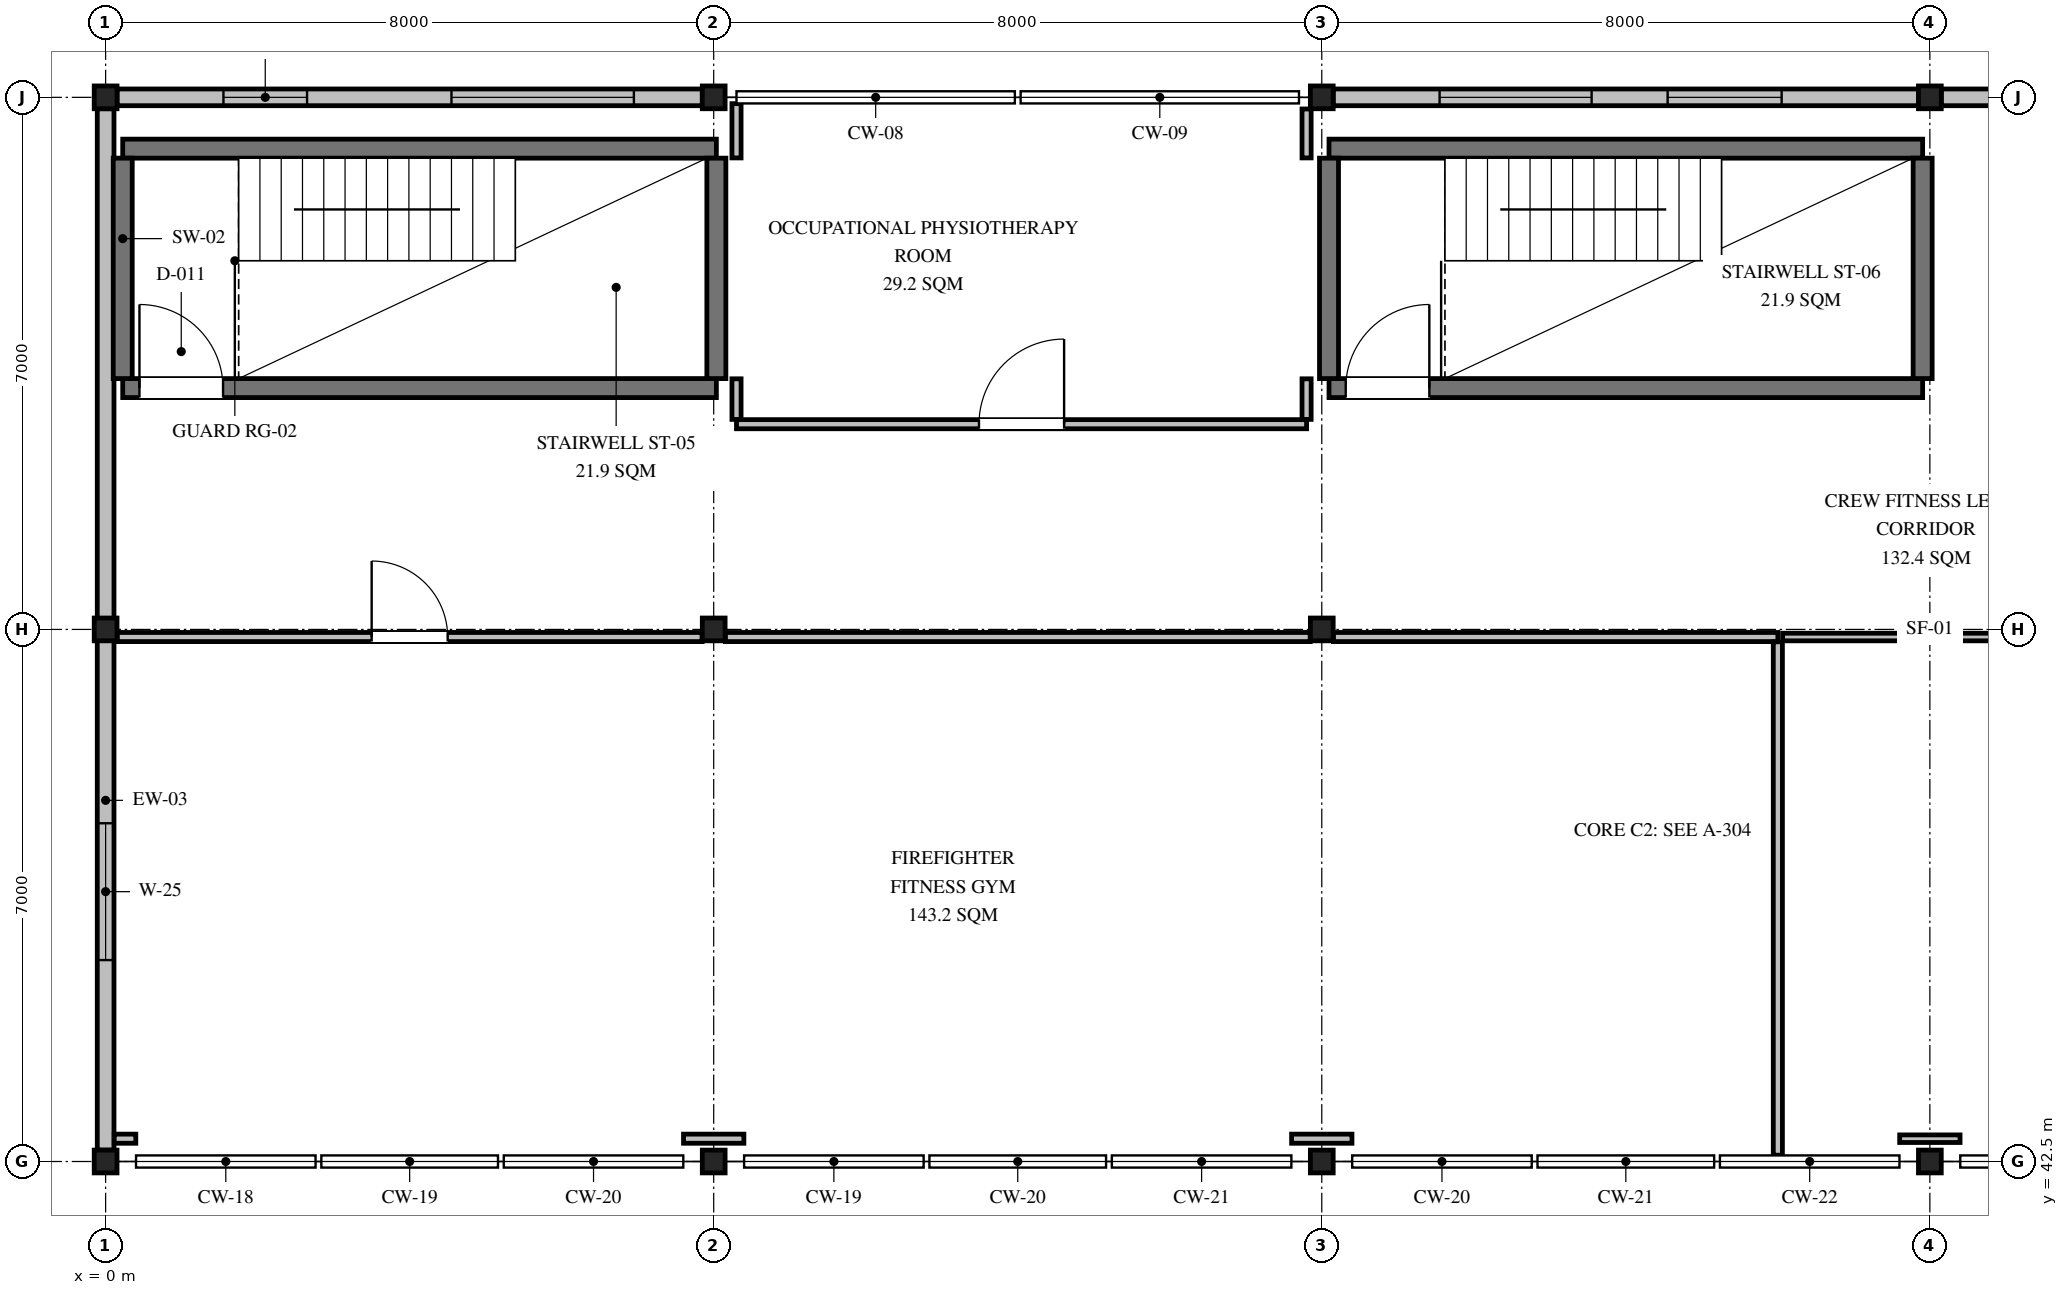
"""IFC4 building model, lengths in metres.
Left out: names, types, materials, properties, quantities, classifications, styles, units other than length and angle.
Written with IfcOpenShell. Run it as: python <this file> out.ifc"""

import sys

from ifc_helpers import new_model, si_unit, direction, frame, frame_2d, origin, origin_2d, place, context, subcontext, project, spatial, rectangle, i_section, extrude, element, fill, save


model = new_model("IFC4")
c1 = context("Model", 3, precision=1e-05, world=origin(), true_north=direction((0.0, 1.0)))
c2 = subcontext(c1, "Body", "Model", "MODEL_VIEW")
j1 = project(units=[si_unit("LENGTHUNIT", "METRE"), si_unit("PLANEANGLEUNIT", "RADIAN")], contexts=[c1])
p1 = place(None, origin())
s1 = spatial("IfcSite", under=j1, at=p1, CompositionType="ELEMENT")
p2 = place(p1, origin())
s2 = spatial("IfcBuilding", under=s1, at=p2, CompositionType="ELEMENT")
p3 = place(p2, frame((0.0, 0.0, 10.05)))
s3 = spatial("IfcBuildingStorey", under=s2, at=p3, CompositionType="ELEMENT", Elevation=10.05)
for number, where, z_axis, x_axis in (
    (1, (0.0, 42.5, 0.0), (0.0, 0.0, 1.0), (1.0, 0.0, 0.0)),
    (2, (0.0, 49.5, 0.0), (0.0, 0.0, 1.0), (1.0, 0.0, 0.0)),
    (3, (0.0, 56.5, 0.0), (0.0, 0.0, 1.0), (1.0, 0.0, 0.0)),
    (4, (8.0, 42.5, 0.0), (0.0, 0.0, 1.0), (1.0, 0.0, 0.0)),
    (5, (8.0, 49.5, 0.0), (0.0, 0.0, 1.0), (1.0, 0.0, 0.0)),
    (6, (8.0, 56.5, 0.0), (0.0, 0.0, 1.0), (1.0, 0.0, 0.0)),
    (7, (16.0, 42.5, 0.0), (0.0, 0.0, 1.0), (1.0, 0.0, 0.0)),
    (8, (16.0, 49.5, 0.0), (0.0, 0.0, 1.0), (1.0, 0.0, 0.0)),
    (9, (16.0, 56.5, 0.0), (0.0, 0.0, 1.0), (1.0, 0.0, 0.0)),
    (10, (24.0, 42.5, 0.0), (0.0, 0.0, 1.0), (1.0, 0.0, 0.0)),
    (11, (24.0, 49.5, 0.0), (0.0, 0.0, 1.0), (1.0, 0.0, 0.0)),
    (12, (24.0, 56.5, 0.0), (0.0, 0.0, 1.0), (1.0, 0.0, 0.0)),
):
    element("IfcColumn", number, at=place(p3, frame(where, z_axis=z_axis, x_axis=x_axis)), inside=s3, PredefinedType="COLUMN", context=c2, shape_type="SweptSolid", body=[
        extrude(i_section(OverallWidth=0.3, OverallDepth=0.3, WebThickness=0.01, FlangeThickness=0.015, FilletRadius=0.018, at=origin_2d()), origin(), (0.0, 0.0, 1.0), 4.2),
    ])
p4 = place(p3, frame((0.0, 42.65, 0.0), z_axis=(0.0, 0.0, 1.0), x_axis=(0.0, 1.0, 0.0)))
e13 = element("IfcWall", 13, at=p4, inside=s3, PredefinedType="SOLIDWALL", context=c2, shape_type="SweptSolid", body=[
    extrude(rectangle(XDim=13.7, YDim=0.22, at=frame_2d((6.85, 0.0))), origin(), (0.0, 0.0, 1.0), 3.474),
])
p5 = place(p4, frame((2.5, 0.0, 1.0)))
e14 = element("IfcOpeningElement", 14, at=p5, cuts=e13, PredefinedType="OPENING", context=c2, shape_type="SweptSolid", body=[
    extrude(rectangle(XDim=1.8, YDim=1.8, at=frame_2d((0.9, 0.9))), frame((0.0, 0.12, 0.0), z_axis=(0.0, -1.0, 0.0), x_axis=(1.0, 0.0, 0.0)), (0.0, 0.0, 1.0), 0.24),
])
p6 = place(p3, frame((0.15, 56.5, 0.0), z_axis=(0.0, 0.0, 1.0), x_axis=(1.0, 0.0, 0.0)))
e15 = element("IfcWall", 15, at=p6, inside=s3, PredefinedType="SOLIDWALL", context=c2, shape_type="SweptSolid", body=[
    extrude(rectangle(XDim=7.7, YDim=0.22, at=frame_2d((3.85, 0.0))), origin(), (0.0, 0.0, 1.0), 3.584),
])
p7 = place(p6, frame((1.4, 0.0, 0.95)))
e16 = element("IfcOpeningElement", 16, at=p7, cuts=e15, PredefinedType="OPENING", context=c2, shape_type="SweptSolid", body=[
    extrude(rectangle(XDim=1.1, YDim=1.5, at=frame_2d((0.55, 0.75))), frame((0.0, 0.12, 0.0), z_axis=(0.0, -1.0, 0.0), x_axis=(1.0, 0.0, 0.0)), (0.0, 0.0, 1.0), 0.24),
])
p8 = place(p6, frame((4.4, 0.0, 0.95)))
e17 = element("IfcOpeningElement", 17, at=p8, cuts=e15, PredefinedType="OPENING", context=c2, shape_type="SweptSolid", body=[
    extrude(rectangle(XDim=2.4, YDim=1.8, at=frame_2d((1.2, 0.9))), frame((0.0, 0.12, 0.0), z_axis=(0.0, -1.0, 0.0), x_axis=(1.0, 0.0, 0.0)), (0.0, 0.0, 1.0), 0.24),
])
p9 = place(p3, frame((16.15, 56.5, 0.0), z_axis=(0.0, 0.0, 1.0), x_axis=(1.0, 0.0, 0.0)))
e18 = element("IfcWall", 18, at=p9, inside=s3, PredefinedType="SOLIDWALL", context=c2, shape_type="SweptSolid", body=[
    extrude(rectangle(XDim=7.7, YDim=0.22, at=frame_2d((3.85, 0.0))), origin(), (0.0, 0.0, 1.0), 3.274),
])
p10 = place(p9, frame((1.4, 0.0, 0.95)))
e19 = element("IfcOpeningElement", 19, at=p10, cuts=e18, PredefinedType="OPENING", context=c2, shape_type="SweptSolid", body=[
    extrude(rectangle(XDim=2.0, YDim=1.5, at=frame_2d((1.0, 0.75))), frame((0.0, 0.12, 0.0), z_axis=(0.0, -1.0, 0.0), x_axis=(1.0, 0.0, 0.0)), (0.0, 0.0, 1.0), 0.24),
])
p11 = place(p9, frame((4.4, 0.0, 0.95)))
e20 = element("IfcOpeningElement", 20, at=p11, cuts=e18, PredefinedType="OPENING", context=c2, shape_type="SweptSolid", body=[
    extrude(rectangle(XDim=1.5, YDim=2.1, at=frame_2d((0.75, 1.05))), frame((0.0, 0.12, 0.0), z_axis=(0.0, -1.0, 0.0), x_axis=(1.0, 0.0, 0.0)), (0.0, 0.0, 1.0), 0.24),
])
p12 = place(p3, frame((24.15, 56.5, 0.0), z_axis=(0.0, 0.0, 1.0), x_axis=(1.0, 0.0, 0.0)))
e21 = element("IfcWall", 21, at=p12, inside=s3, PredefinedType="SOLIDWALL", context=c2, shape_type="SweptSolid", body=[
    extrude(rectangle(XDim=7.7, YDim=0.22, at=frame_2d((3.85, 0.0))), origin(), (0.0, 0.0, 1.0), 3.474),
])
p13 = place(p12, frame((1.4, 0.0, 0.95)))
e22 = element("IfcOpeningElement", 22, at=p13, cuts=e21, PredefinedType="OPENING", context=c2, shape_type="SweptSolid", body=[
    extrude(rectangle(XDim=1.2, YDim=1.8, at=frame_2d((0.6, 0.9))), frame((0.0, 0.12, 0.0), z_axis=(0.0, -1.0, 0.0), x_axis=(1.0, 0.0, 0.0)), (0.0, 0.0, 1.0), 0.24),
])
p14 = place(p12, frame((4.4, 0.0, 0.95)))
e23 = element("IfcOpeningElement", 23, at=p14, cuts=e21, PredefinedType="OPENING", context=c2, shape_type="SweptSolid", body=[
    extrude(rectangle(XDim=2.5, YDim=2.1, at=frame_2d((1.25, 1.05))), frame((0.0, 0.12, 0.0), z_axis=(0.0, -1.0, 0.0), x_axis=(1.0, 0.0, 0.0)), (0.0, 0.0, 1.0), 0.24),
])
p15 = place(p3, frame((0.225, 52.675, 0.0), z_axis=(0.0, 0.0, 1.0), x_axis=(1.0, 0.0, 0.0)))
e24 = element("IfcWall", 24, at=p15, inside=s3, PredefinedType="SHEAR", context=c2, shape_type="SweptSolid", body=[
    extrude(rectangle(XDim=7.81, YDim=0.25, at=frame_2d((3.905, 0.0))), origin(), (0.0, 0.0, 1.0), 3.98),
])
p16 = place(p15, frame((0.22, 0.0, 0.0)))
e25 = element("IfcOpeningElement", 25, at=p16, cuts=e24, PredefinedType="OPENING", context=c2, shape_type="SweptSolid", body=[
    extrude(rectangle(XDim=1.1, YDim=2.15, at=frame_2d((0.55, 1.075))), frame((0.0, 0.135, 0.0), z_axis=(0.0, -1.0, 0.0), x_axis=(1.0, 0.0, 0.0)), (0.0, 0.0, 1.0), 0.27),
])
p17 = place(p3, frame((0.225, 55.825, 0.0), z_axis=(0.0, 0.0, 1.0), x_axis=(1.0, 0.0, 0.0)))
e26 = element("IfcWall", 26, at=p17, inside=s3, PredefinedType="SHEAR", context=c2, shape_type="SweptSolid", body=[
    extrude(rectangle(XDim=7.81, YDim=0.25, at=frame_2d((3.905, 0.0))), origin(), (0.0, 0.0, 1.0), 3.98),
])
for number, where, z_axis, x_axis in (
    (27, (0.225, 52.8, 0.0), (0.0, 0.0, 1.0), (0.0, 1.0, 0.0)),
    (28, (8.035, 52.8, 0.0), (0.0, 0.0, 1.0), (0.0, 1.0, 0.0)),
):
    element("IfcWall", number, at=place(p3, frame(where, z_axis=z_axis, x_axis=x_axis)), inside=s3, PredefinedType="SHEAR", context=c2, shape_type="SweptSolid", body=[
        extrude(rectangle(XDim=2.9, YDim=0.25, at=frame_2d((1.45, 0.0))), origin(), (0.0, 0.0, 1.0), 3.98),
    ])
p18 = place(p3, frame((16.095, 52.675, 0.0), z_axis=(0.0, 0.0, 1.0), x_axis=(1.0, 0.0, 0.0)))
e29 = element("IfcWall", 29, at=p18, inside=s3, PredefinedType="SHEAR", context=c2, shape_type="SweptSolid", body=[
    extrude(rectangle(XDim=7.81, YDim=0.25, at=frame_2d((3.905, 0.0))), origin(), (0.0, 0.0, 1.0), 3.98),
])
p19 = place(p18, frame((0.22, 0.0, 0.0)))
e30 = element("IfcOpeningElement", 30, at=p19, cuts=e29, PredefinedType="OPENING", context=c2, shape_type="SweptSolid", body=[
    extrude(rectangle(XDim=1.1, YDim=2.15, at=frame_2d((0.55, 1.075))), frame((0.0, 0.135, 0.0), z_axis=(0.0, -1.0, 0.0), x_axis=(1.0, 0.0, 0.0)), (0.0, 0.0, 1.0), 0.27),
])
p20 = place(p3, frame((16.095, 55.825, 0.0), z_axis=(0.0, 0.0, 1.0), x_axis=(1.0, 0.0, 0.0)))
e31 = element("IfcWall", 31, at=p20, inside=s3, PredefinedType="SHEAR", context=c2, shape_type="SweptSolid", body=[
    extrude(rectangle(XDim=7.81, YDim=0.25, at=frame_2d((3.905, 0.0))), origin(), (0.0, 0.0, 1.0), 3.98),
])
for number, where, z_axis, x_axis in (
    (32, (16.095, 52.8, 0.0), (0.0, 0.0, 1.0), (0.0, 1.0, 0.0)),
    (33, (23.905, 52.8, 0.0), (0.0, 0.0, 1.0), (0.0, 1.0, 0.0)),
):
    element("IfcWall", number, at=place(p3, frame(where, z_axis=z_axis, x_axis=x_axis)), inside=s3, PredefinedType="SHEAR", context=c2, shape_type="SweptSolid", body=[
        extrude(rectangle(XDim=2.9, YDim=0.25, at=frame_2d((1.45, 0.0))), origin(), (0.0, 0.0, 1.0), 3.98),
    ])
p21 = place(p3, frame((0.113, 42.8, 0.0), z_axis=(0.0, 0.0, 1.0), x_axis=(1.0, 0.0, 0.0)))
e34 = element("IfcWall", 34, at=p21, inside=s3, PredefinedType="PARTITIONING", context=c2, shape_type="SweptSolid", body=[
    extrude(rectangle(XDim=0.284, YDim=0.12, at=frame_2d((0.142, 0.0))), origin(), (0.0, 0.0, 1.0), 3.98),
])
for number, where, z_axis, x_axis in (
    (35, (7.603, 42.8, 0.0), (0.0, 0.0, 1.0), (1.0, 0.0, 0.0)),
    (36, (15.603, 42.8, 0.0), (0.0, 0.0, 1.0), (1.0, 0.0, 0.0)),
):
    element("IfcWall", number, at=place(p3, frame(where, z_axis=z_axis, x_axis=x_axis)), inside=s3, PredefinedType="PARTITIONING", context=c2, shape_type="SweptSolid", body=[
        extrude(rectangle(XDim=0.794, YDim=0.12, at=frame_2d((0.397, 0.0))), origin(), (0.0, 0.0, 1.0), 3.98),
    ])
p22 = place(p3, frame((0.153, 49.4, 0.0), z_axis=(0.0, 0.0, 1.0), x_axis=(1.0, 0.0, 0.0)))
e37 = element("IfcWall", 37, at=p22, inside=s3, PredefinedType="PARTITIONING", context=c2, shape_type="SweptSolid", body=[
    extrude(rectangle(XDim=7.694, YDim=0.12, at=frame_2d((3.847, 0.0))), origin(), (0.0, 0.0, 1.0), 3.634),
])
p23 = place(p22, frame((3.347, 0.0, 0.0)))
e38 = element("IfcOpeningElement", 38, at=p23, cuts=e37, PredefinedType="OPENING", context=c2, shape_type="SweptSolid", body=[
    extrude(rectangle(XDim=1.0, YDim=2.1, at=frame_2d((0.5, 1.05))), frame((0.0, 0.07, 0.0), z_axis=(0.0, -1.0, 0.0), x_axis=(1.0, 0.0, 0.0)), (0.0, 0.0, 1.0), 0.14),
])
p24 = place(p3, frame((8.153, 49.4, 0.0), z_axis=(0.0, 0.0, 1.0), x_axis=(1.0, 0.0, 0.0)))
e39 = element("IfcWall", 39, at=p24, inside=s3, PredefinedType="PARTITIONING", context=c2, shape_type="SweptSolid", body=[
    extrude(rectangle(XDim=7.694, YDim=0.12, at=frame_2d((3.847, 0.0))), origin(), (0.0, 0.0, 1.0), 3.274),
])
p25 = place(p3, frame((16.153, 49.4, 0.0), z_axis=(0.0, 0.0, 1.0), x_axis=(1.0, 0.0, 0.0)))
e40 = element("IfcWall", 40, at=p25, inside=s3, PredefinedType="PARTITIONING", context=c2, shape_type="SweptSolid", body=[
    extrude(rectangle(XDim=5.847, YDim=0.12, at=frame_2d((2.923, 0.0))), origin(), (0.0, 0.0, 1.0), 3.386),
])
p26 = place(p3, frame((22.0, 42.583, 0.0), z_axis=(0.0, 0.0, 1.0), x_axis=(0.0, 1.0, 0.0)))
e41 = element("IfcWall", 41, at=p26, inside=s3, PredefinedType="PARTITIONING", context=c2, shape_type="SweptSolid", body=[
    extrude(rectangle(XDim=6.754, YDim=0.12, at=frame_2d((3.377, 0.0))), origin(), (0.0, 0.0, 1.0), 3.98),
])
p27 = place(p3, frame((23.603, 42.8, 0.0), z_axis=(0.0, 0.0, 1.0), x_axis=(1.0, 0.0, 0.0)))
e42 = element("IfcWall", 42, at=p27, inside=s3, PredefinedType="PARTITIONING", context=c2, shape_type="SweptSolid", body=[
    extrude(rectangle(XDim=0.794, YDim=0.1, at=frame_2d((0.397, 0.0))), origin(), (0.0, 0.0, 1.0), 3.98),
])
p28 = place(p3, frame((22.063, 49.4, 0.0), z_axis=(0.0, 0.0, 1.0), x_axis=(1.0, 0.0, 0.0)))
e43 = element("IfcWall", 43, at=p28, inside=s3, PredefinedType="PARTITIONING", context=c2, shape_type="SweptSolid", body=[
    extrude(rectangle(XDim=1.784, YDim=0.1, at=frame_2d((0.892, 0.0))), origin(), (0.0, 0.0, 1.0), 3.386),
])
p29 = place(p3, frame((24.153, 49.4, 0.0), z_axis=(0.0, 0.0, 1.0), x_axis=(1.0, 0.0, 0.0)))
e44 = element("IfcWall", 44, at=p29, inside=s3, PredefinedType="PARTITIONING", context=c2, shape_type="SweptSolid", body=[
    extrude(rectangle(XDim=7.694, YDim=0.1, at=frame_2d((3.847, 0.0))), origin(), (0.0, 0.0, 1.0), 3.324),
])
p30 = place(p29, frame((3.347, 0.0, 0.0)))
e45 = element("IfcOpeningElement", 45, at=p30, cuts=e44, PredefinedType="OPENING", context=c2, shape_type="SweptSolid", body=[
    extrude(rectangle(XDim=1.0, YDim=2.1, at=frame_2d((0.5, 1.05))), frame((0.0, 0.06, 0.0), z_axis=(0.0, -1.0, 0.0), x_axis=(1.0, 0.0, 0.0)), (0.0, 0.0, 1.0), 0.12),
])
p31 = place(p3, frame((8.3, 52.2, 0.0), z_axis=(0.0, 0.0, 1.0), x_axis=(1.0, 0.0, 0.0)))
e46 = element("IfcWall", 46, at=p31, inside=s3, PredefinedType="PARTITIONING", context=c2, shape_type="SweptSolid", body=[
    extrude(rectangle(XDim=7.5, YDim=0.12, at=frame_2d((3.75, 0.0))), origin(), (0.0, 0.0, 1.0), 3.98),
])
p32 = place(p31, frame((3.19, 0.0, 0.0)))
e47 = element("IfcOpeningElement", 47, at=p32, cuts=e46, PredefinedType="OPENING", context=c2, shape_type="SweptSolid", body=[
    extrude(rectangle(XDim=1.12, YDim=2.1, at=frame_2d((0.56, 1.05))), frame((0.0, 0.07, 0.0), z_axis=(0.0, -1.0, 0.0), x_axis=(1.0, 0.0, 0.0)), (0.0, 0.0, 1.0), 0.14),
])
p33 = place(p3, frame((8.3, 52.263, 0.0), z_axis=(0.0, 0.0, 1.0), x_axis=(0.0, 1.0, 0.0)))
e48 = element("IfcWall", 48, at=p33, inside=s3, PredefinedType="PARTITIONING", context=c2, shape_type="SweptSolid", body=[
    extrude(rectangle(XDim=0.534, YDim=0.12, at=frame_2d((0.267, 0.0))), origin(), (0.0, 0.0, 1.0), 3.98),
])
p34 = place(p3, frame((8.3, 55.703, 0.0), z_axis=(0.0, 0.0, 1.0), x_axis=(0.0, 1.0, 0.0)))
e49 = element("IfcWall", 49, at=p34, inside=s3, PredefinedType="PARTITIONING", context=c2, shape_type="SweptSolid", body=[
    extrude(rectangle(XDim=0.714, YDim=0.12, at=frame_2d((0.357, 0.0))), origin(), (0.0, 0.0, 1.0), 3.98),
])
p35 = place(p3, frame((15.8, 52.263, 0.0), z_axis=(0.0, 0.0, 1.0), x_axis=(0.0, 1.0, 0.0)))
e50 = element("IfcWall", 50, at=p35, inside=s3, PredefinedType="PARTITIONING", context=c2, shape_type="SweptSolid", body=[
    extrude(rectangle(XDim=0.534, YDim=0.12, at=frame_2d((0.267, 0.0))), origin(), (0.0, 0.0, 1.0), 3.98),
])
p36 = place(p3, frame((15.8, 55.703, 0.0), z_axis=(0.0, 0.0, 1.0), x_axis=(0.0, 1.0, 0.0)))
e51 = element("IfcWall", 51, at=p36, inside=s3, PredefinedType="PARTITIONING", context=c2, shape_type="SweptSolid", body=[
    extrude(rectangle(XDim=0.644, YDim=0.12, at=frame_2d((0.322, 0.0))), origin(), (0.0, 0.0, 1.0), 3.98),
])
p37 = place(p5, origin())
e52 = element("IfcWindow", 52, at=p37, inside=s3, PartitioningType="SINGLE_PANEL", PredefinedType="WINDOW", context=c2, shape_type="SweptSolid", body=[
    extrude(rectangle(XDim=1.8, YDim=1.8, at=frame_2d((0.9, 0.9))), frame((0.0, 0.03, 0.0), z_axis=(0.0, -1.0, 0.0), x_axis=(1.0, 0.0, 0.0)), (0.0, 0.0, 1.0), 0.06),
])
fill(e14, e52)
p38 = place(p7, origin())
e53 = element("IfcWindow", 53, at=p38, inside=s3, PartitioningType="SINGLE_PANEL", PredefinedType="WINDOW", context=c2, shape_type="SweptSolid", body=[
    extrude(rectangle(XDim=1.1, YDim=1.5, at=frame_2d((0.55, 0.75))), frame((0.0, 0.03, 0.0), z_axis=(0.0, -1.0, 0.0), x_axis=(1.0, 0.0, 0.0)), (0.0, 0.0, 1.0), 0.06),
])
fill(e16, e53)
p39 = place(p8, origin())
e54 = element("IfcWindow", 54, at=p39, inside=s3, PartitioningType="SINGLE_PANEL", PredefinedType="WINDOW", context=c2, shape_type="SweptSolid", body=[
    extrude(rectangle(XDim=2.4, YDim=1.8, at=frame_2d((1.2, 0.9))), frame((0.0, 0.03, 0.0), z_axis=(0.0, -1.0, 0.0), x_axis=(1.0, 0.0, 0.0)), (0.0, 0.0, 1.0), 0.06),
])
fill(e17, e54)
p40 = place(p10, origin())
e55 = element("IfcWindow", 55, at=p40, inside=s3, PartitioningType="SINGLE_PANEL", PredefinedType="WINDOW", context=c2, shape_type="SweptSolid", body=[
    extrude(rectangle(XDim=2.0, YDim=1.5, at=frame_2d((1.0, 0.75))), frame((0.0, 0.03, 0.0), z_axis=(0.0, -1.0, 0.0), x_axis=(1.0, 0.0, 0.0)), (0.0, 0.0, 1.0), 0.06),
])
fill(e19, e55)
p41 = place(p11, origin())
e56 = element("IfcWindow", 56, at=p41, inside=s3, PartitioningType="SINGLE_PANEL", PredefinedType="WINDOW", context=c2, shape_type="SweptSolid", body=[
    extrude(rectangle(XDim=1.5, YDim=2.1, at=frame_2d((0.75, 1.05))), frame((0.0, 0.03, 0.0), z_axis=(0.0, -1.0, 0.0), x_axis=(1.0, 0.0, 0.0)), (0.0, 0.0, 1.0), 0.06),
])
fill(e20, e56)
p42 = place(p16, frame((1.1, 0.0, 0.0), z_axis=(0.0, 0.0, 1.0), x_axis=(-1.0, 0.0, 0.0)))
e57 = element("IfcDoor", 57, at=p42, inside=s3, OperationType="SINGLE_SWING_LEFT", PredefinedType="DOOR", context=c2, shape_type="SweptSolid", body=[
    extrude(rectangle(XDim=1.1, YDim=2.15, at=frame_2d((0.55, 1.075))), frame((0.0, 0.025, 0.0), z_axis=(0.0, -1.0, 0.0), x_axis=(1.0, 0.0, 0.0)), (0.0, 0.0, 1.0), 0.05),
])
fill(e25, e57)
p43 = place(p19, frame((1.1, 0.0, 0.0), z_axis=(0.0, 0.0, 1.0), x_axis=(-1.0, 0.0, 0.0)))
e58 = element("IfcDoor", 58, at=p43, inside=s3, OperationType="SINGLE_SWING_RIGHT", PredefinedType="DOOR", context=c2, shape_type="SweptSolid", body=[
    extrude(rectangle(XDim=1.1, YDim=2.15, at=frame_2d((0.55, 1.075))), frame((0.0, 0.025, 0.0), z_axis=(0.0, -1.0, 0.0), x_axis=(1.0, 0.0, 0.0)), (0.0, 0.0, 1.0), 0.05),
])
fill(e30, e58)
p44 = place(p23, origin())
e59 = element("IfcDoor", 59, at=p44, inside=s3, OperationType="SINGLE_SWING_LEFT", PredefinedType="DOOR", context=c2, shape_type="SweptSolid", body=[
    extrude(rectangle(XDim=1.0, YDim=2.1, at=frame_2d((0.5, 1.05))), frame((0.0, 0.025, 0.0), z_axis=(0.0, -1.0, 0.0), x_axis=(1.0, 0.0, 0.0)), (0.0, 0.0, 1.0), 0.05),
])
fill(e38, e59)
p45 = place(p32, origin())
e60 = element("IfcDoor", 60, at=p45, inside=s3, OperationType="SINGLE_SWING_RIGHT", PredefinedType="DOOR", context=c2, shape_type="SweptSolid", body=[
    extrude(rectangle(XDim=1.12, YDim=2.1, at=frame_2d((0.56, 1.05))), frame((0.0, 0.025, 0.0), z_axis=(0.0, -1.0, 0.0), x_axis=(1.0, 0.0, 0.0)), (0.0, 0.0, 1.0), 0.05),
])
fill(e47, e60)
save(model, sys.argv[1])
